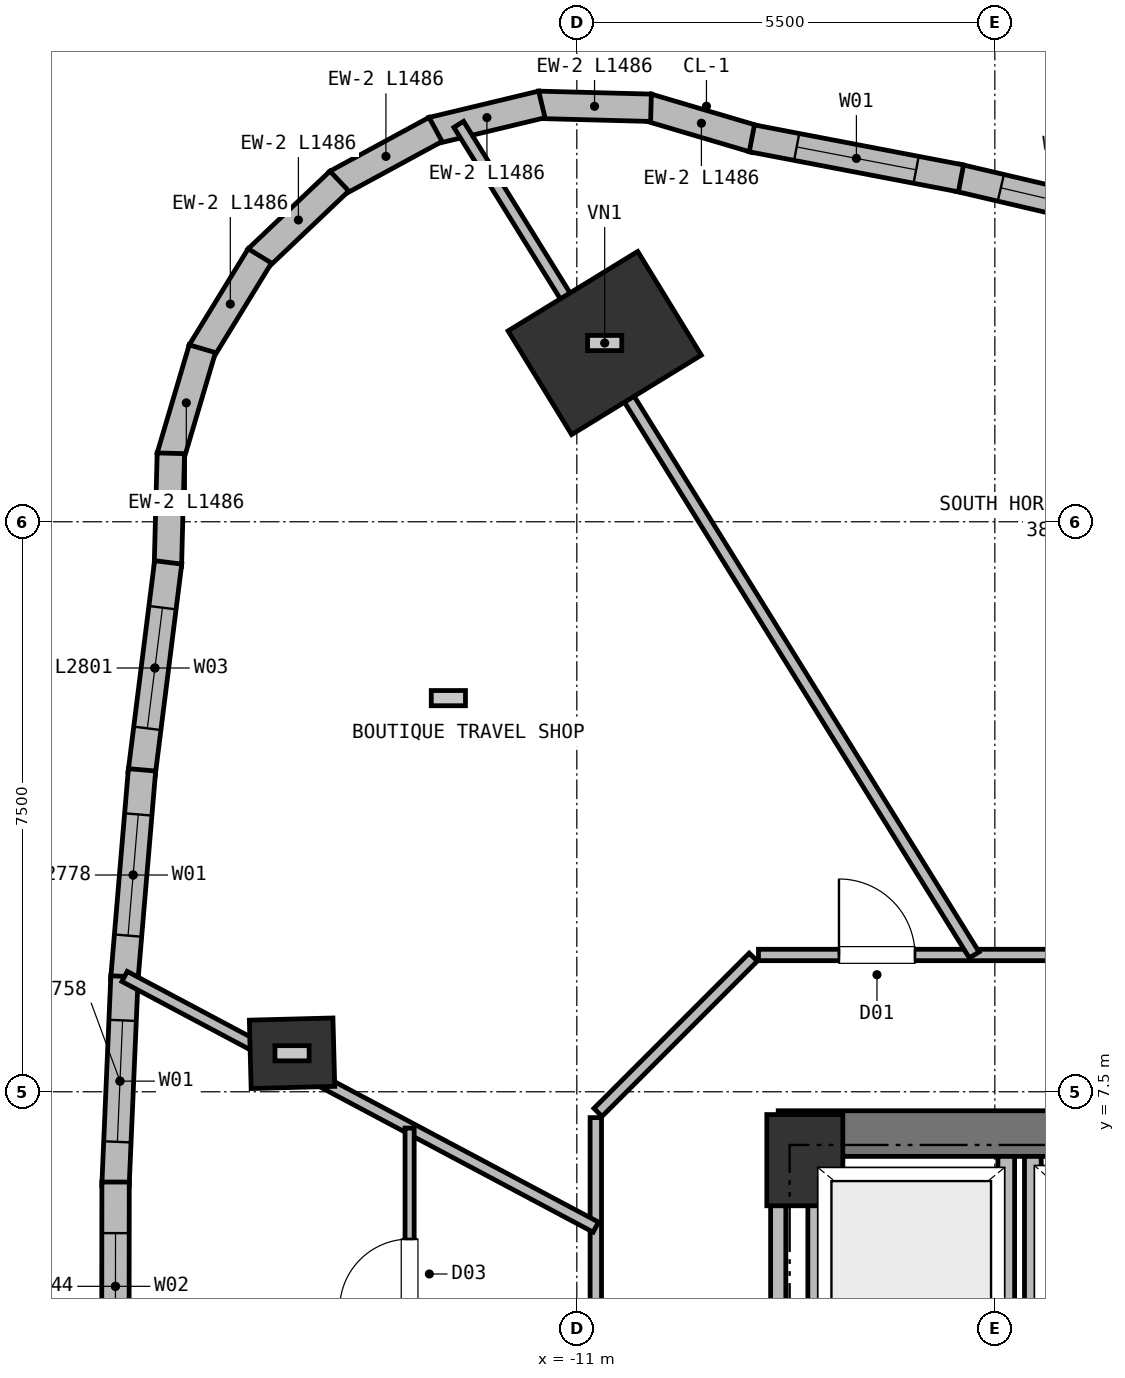
"""IFC4 building model, lengths in metres.
Left out: names, types, materials, properties, quantities, classifications, styles, units other than length and angle.
Written with IfcOpenShell. Run it as: python <this file> out.ifc"""

import sys

from ifc_helpers import new_model, si_unit, direction, frame, frame_2d, origin, origin_2d, place, context, subcontext, project, spatial, rectangle, extrude, element, fill, save


model = new_model("IFC4")
c1 = context("Model", 3, precision=1e-05, world=origin(), true_north=direction((0.0, 1.0)))
c2 = subcontext(c1, "Body", "Model", "MODEL_VIEW")
j1 = project(units=[si_unit("LENGTHUNIT", "METRE"), si_unit("PLANEANGLEUNIT", "RADIAN")], contexts=[c1])
p1 = place(None, origin())
s1 = spatial("IfcSite", under=j1, at=p1, CompositionType="ELEMENT")
p2 = place(p1, origin())
s2 = spatial("IfcBuilding", under=s1, at=p2, CompositionType="ELEMENT")
p3 = place(p2, frame((0.0, 0.0, 142.25)))
s3 = spatial("IfcBuildingStorey", under=s2, at=p3, CompositionType="ELEMENT", Elevation=142.25)
p4 = place(p3, frame((-8.0, 6.6, 0.0), z_axis=(0.0, 0.0, 1.0), x_axis=(1.0, 0.0, 0.0)))
e1 = element("IfcColumn", 1, at=p4, inside=s3, PredefinedType="COLUMN", context=c2, shape_type="SweptSolid", body=[
    extrude(rectangle(XDim=1.0, YDim=1.2, at=origin_2d()), origin(), (0.0, 0.0, 1.0), 3.75),
])
p5 = place(p3, frame((-8.35, 6.95, 0.0), z_axis=(0.0, 0.0, 1.0), x_axis=(1.0, 0.0, 0.0)))
e2 = element("IfcWall", 2, at=p5, inside=s3, PredefinedType="SHEAR", context=c2, shape_type="SweptSolid", body=[
    extrude(rectangle(XDim=16.7, YDim=0.6, at=frame_2d((8.35, 0.0))), origin(), (0.0, 0.0, 1.0), 3.5),
])
p6 = place(p3, frame((-10.633, 17.352, 0.0), z_axis=(0.0, 0.0, 1.0), x_axis=(-0.522498564716, 0.852640164354, 0.0)))
e3 = element("IfcColumn", 3, at=p6, inside=s3, PredefinedType="COLUMN", context=c2, shape_type="SweptSolid", body=[
    extrude(rectangle(XDim=1.6, YDim=2.0, at=origin_2d()), origin(), (0.0, 0.0, 1.0), 3.75),
])
p7 = place(p3, frame((-14.747, 8.007, 0.0), z_axis=(0.0, 0.0, 1.0), x_axis=(-0.026176948308, 0.999657324976, 0.0)))
e4 = element("IfcColumn", 4, at=p7, inside=s3, PredefinedType="COLUMN", context=c2, shape_type="SweptSolid", body=[
    extrude(rectangle(XDim=0.9, YDim=1.1, at=origin_2d()), origin(), (0.0, 0.0, 1.0), 3.75),
])
for number, where, z_axis, x_axis in (
    (5, (-10.073, 20.455, 0.0), (0.0, 0.0, 1.0), (0.959, -0.284, 0.0)),
    (6, (-11.51, 20.486, 0.0), (0.0, 0.0, 1.0), (1.0, -0.026, 0.0)),
):
    element("IfcWall", number, at=place(p3, frame(where, z_axis=z_axis, x_axis=x_axis)), inside=s3, PredefinedType="SOLIDWALL", context=c2, shape_type="SweptSolid", body=[
        extrude(rectangle(XDim=1.486, YDim=0.36, at=frame_2d((0.743, 0.0))), origin(), (0.0, 0.0, 1.0), 3.5),
    ])
p8 = place(p3, frame((-12.905, 20.145, 0.0), z_axis=(0.0, 0.0, 1.0), x_axis=(0.972390285352, 0.233360521413, 0.0)))
e7 = element("IfcWall", 7, at=p8, inside=s3, PredefinedType="SOLIDWALL", context=c2, shape_type="SweptSolid", body=[
    extrude(rectangle(XDim=1.486, YDim=0.36, at=frame_2d((0.743, 0.0))), origin(), (0.0, 0.0, 1.0), 3.5),
])
p9 = place(p3, frame((-14.164, 19.453, 0.0), z_axis=(0.0, 0.0, 1.0), x_axis=(0.87890460574, 0.476997582812, 0.0)))
e8 = element("IfcWall", 8, at=p9, inside=s3, PredefinedType="SOLIDWALL", context=c2, shape_type="SweptSolid", body=[
    extrude(rectangle(XDim=1.486, YDim=0.36, at=frame_2d((0.743, 0.0))), origin(), (0.0, 0.0, 1.0), 3.5),
])
p10 = place(p3, frame((-15.202, 18.46, 0.0), z_axis=(0.0, 0.0, 1.0), x_axis=(0.725352183474, 0.688377955726, 0.0)))
e9 = element("IfcWall", 9, at=p10, inside=s3, PredefinedType="SOLIDWALL", context=c2, shape_type="SweptSolid", body=[
    extrude(rectangle(XDim=1.486, YDim=0.36, at=frame_2d((0.743, 0.0))), origin(), (0.0, 0.0, 1.0), 3.5),
])
p11 = place(p3, frame((-15.947, 17.231, 0.0), z_axis=(0.0, 0.0, 1.0), x_axis=(0.522519673624, 0.852627228439, 0.0)))
e10 = element("IfcWall", 10, at=p11, inside=s3, PredefinedType="SOLIDWALL", context=c2, shape_type="SweptSolid", body=[
    extrude(rectangle(XDim=1.486, YDim=0.36, at=frame_2d((0.743, 0.0))), origin(), (0.0, 0.0, 1.0), 3.5),
])
for number, where, z_axis, x_axis in (
    (11, (-16.349, 15.852, 0.0), (0.0, 0.0, 1.0), (0.284, 0.959, 0.0)),
    (12, (-16.38, 14.416, 0.0), (0.0, 0.0, 1.0), (0.026, 1.0, 0.0)),
):
    element("IfcWall", number, at=place(p3, frame(where, z_axis=z_axis, x_axis=x_axis)), inside=s3, PredefinedType="SOLIDWALL", context=c2, shape_type="SweptSolid", body=[
        extrude(rectangle(XDim=1.486, YDim=0.36, at=frame_2d((0.743, 0.0))), origin(), (0.0, 0.0, 1.0), 3.5),
    ])
p12 = place(p3, frame((-16.725, 11.686, 0.0), z_axis=(0.0, 0.0, 1.0), x_axis=(0.124635429152, 0.992202605217, 0.0)))
e13 = element("IfcWall", 13, at=p12, inside=s3, PredefinedType="SOLIDWALL", context=c2, shape_type="SweptSolid", body=[
    extrude(rectangle(XDim=2.801, YDim=0.36, at=frame_2d((1.4, 0.0))), origin(), (0.0, 0.0, 1.0), 3.5),
])
p13 = place(p12, frame((0.601, 0.0, 0.72)))
e14 = element("IfcOpeningElement", 14, at=p13, cuts=e13, PredefinedType="OPENING", context=c2, shape_type="SweptSolid", body=[
    extrude(rectangle(XDim=1.6, YDim=1.88, at=frame_2d((0.8, 0.94))), frame((0.0, 0.19, 0.0), z_axis=(0.0, -1.0, 0.0), x_axis=(1.0, 0.0, 0.0)), (0.0, 0.0, 1.0), 0.38),
])
p14 = place(p3, frame((-16.954, 8.968, 0.0), z_axis=(0.0, 0.0, 1.0), x_axis=(0.084209356436, 0.996448084091, 0.0)))
e15 = element("IfcWall", 15, at=p14, inside=s3, PredefinedType="SOLIDWALL", context=c2, shape_type="SweptSolid", body=[
    extrude(rectangle(XDim=2.777, YDim=0.36, at=frame_2d((1.389, 0.0))), origin(), (0.0, 0.0, 1.0), 3.5),
])
p15 = place(p14, frame((0.589, 0.0, 0.72)))
e16 = element("IfcOpeningElement", 16, at=p15, cuts=e15, PredefinedType="OPENING", context=c2, shape_type="SweptSolid", body=[
    extrude(rectangle(XDim=1.6, YDim=1.88, at=frame_2d((0.8, 0.94))), frame((0.0, 0.19, 0.0), z_axis=(0.0, -1.0, 0.0), x_axis=(1.0, 0.0, 0.0)), (0.0, 0.0, 1.0), 0.38),
])
p16 = place(p3, frame((-17.07, 6.262, 0.0), z_axis=(0.0, 0.0, 1.0), x_axis=(0.043014721574, 0.999074438532, 0.0)))
e17 = element("IfcWall", 17, at=p16, inside=s3, PredefinedType="SOLIDWALL", context=c2, shape_type="SweptSolid", body=[
    extrude(rectangle(XDim=2.758, YDim=0.36, at=frame_2d((1.379, 0.0))), origin(), (0.0, 0.0, 1.0), 3.5),
])
p17 = place(p16, frame((0.579, 0.0, 0.72)))
e18 = element("IfcOpeningElement", 18, at=p17, cuts=e17, PredefinedType="OPENING", context=c2, shape_type="SweptSolid", body=[
    extrude(rectangle(XDim=1.6, YDim=1.88, at=frame_2d((0.8, 0.94))), frame((0.0, 0.19, 0.0), z_axis=(0.0, -1.0, 0.0), x_axis=(1.0, 0.0, 0.0)), (0.0, 0.0, 1.0), 0.38),
])
p18 = place(p3, frame((-17.072, 3.568, 0.0), z_axis=(0.0, 0.0, 1.0), x_axis=(0.001156582856, 0.999999331158, 0.0)))
e19 = element("IfcWall", 19, at=p18, inside=s3, PredefinedType="SOLIDWALL", context=c2, shape_type="SweptSolid", body=[
    extrude(rectangle(XDim=2.744, YDim=0.36, at=frame_2d((1.372, 0.0))), origin(), (0.0, 0.0, 1.0), 3.5),
])
p19 = place(p18, frame((0.672, 0.0, 0.72)))
e20 = element("IfcOpeningElement", 20, at=p19, cuts=e19, PredefinedType="OPENING", context=c2, shape_type="SweptSolid", body=[
    extrude(rectangle(XDim=1.4, YDim=1.84, at=frame_2d((0.7, 0.92))), frame((0.0, 0.19, 0.0), z_axis=(0.0, -1.0, 0.0), x_axis=(1.0, 0.0, 0.0)), (0.0, 0.0, 1.0), 0.38),
])
p20 = place(p3, frame((-5.995, 19.528, 0.0), z_axis=(0.0, 0.0, 1.0), x_axis=(0.973697722737, -0.227843684873, 0.0)))
e21 = element("IfcWall", 21, at=p20, inside=s3, PredefinedType="SOLIDWALL", context=c2, shape_type="SweptSolid", body=[
    extrude(rectangle(XDim=2.777, YDim=0.36, at=frame_2d((1.389, 0.0))), origin(), (0.0, 0.0, 1.0), 3.5),
])
p21 = place(p20, frame((0.589, 0.0, 0.72)))
e22 = element("IfcOpeningElement", 22, at=p21, cuts=e21, PredefinedType="OPENING", context=c2, shape_type="SweptSolid", body=[
    extrude(rectangle(XDim=1.6, YDim=1.88, at=frame_2d((0.8, 0.94))), frame((0.0, 0.19, 0.0), z_axis=(0.0, -1.0, 0.0), x_axis=(1.0, 0.0, 0.0)), (0.0, 0.0, 1.0), 0.38),
])
p22 = place(p3, frame((-8.697, 20.045, 0.0), z_axis=(0.0, 0.0, 1.0), x_axis=(0.982153479192, -0.188081214668, 0.0)))
e23 = element("IfcWall", 23, at=p22, inside=s3, PredefinedType="SOLIDWALL", context=c2, shape_type="SweptSolid", body=[
    extrude(rectangle(XDim=2.801, YDim=0.36, at=frame_2d((1.401, 0.0))), origin(), (0.0, 0.0, 1.0), 3.5),
])
p23 = place(p22, frame((0.601, 0.0, 0.72)))
e24 = element("IfcOpeningElement", 24, at=p23, cuts=e23, PredefinedType="OPENING", context=c2, shape_type="SweptSolid", body=[
    extrude(rectangle(XDim=1.6, YDim=1.88, at=frame_2d((0.8, 0.94))), frame((0.0, 0.19, 0.0), z_axis=(0.0, -1.0, 0.0), x_axis=(1.0, 0.0, 0.0)), (0.0, 0.0, 1.0), 0.38),
])
p24 = place(p3, frame((-7.85, 4.57, 0.0), z_axis=(0.0, 0.0, 1.0), x_axis=(0.0, 1.0, 0.0)))
e25 = element("IfcWall", 25, at=p24, inside=s3, PredefinedType="PARTITIONING", context=c2, shape_type="SweptSolid", body=[
    extrude(rectangle(XDim=2.08, YDim=0.22, at=frame_2d((1.04, 0.0))), origin(), (0.0, 0.0, 1.0), 3.12),
])
for number, where, z_axis, x_axis in (
    (26, (-5.35, 4.57, 0.0), (0.0, 0.0, 1.0), (0.0, 1.0, 0.0)),
    (27, (-5.0, 4.57, 0.0), (0.0, 0.0, 1.0), (0.0, 1.0, 0.0)),
):
    element("IfcWall", number, at=place(p3, frame(where, z_axis=z_axis, x_axis=x_axis)), inside=s3, PredefinedType="PARTITIONING", context=c2, shape_type="SweptSolid", body=[
        extrude(rectangle(XDim=2.08, YDim=0.22, at=frame_2d((1.04, 0.0))), origin(), (0.0, 0.0, 1.0), 3.5),
    ])
p25 = place(p3, frame((-8.35, 1.15, 0.0), z_axis=(0.0, 0.0, 1.0), x_axis=(0.0, 1.0, 0.0)))
e28 = element("IfcWall", 28, at=p25, inside=s3, PredefinedType="PARTITIONING", context=c2, shape_type="SweptSolid", body=[
    extrude(rectangle(XDim=5.4, YDim=0.2, at=frame_2d((2.7, 0.0))), origin(), (0.0, 0.0, 1.0), 3.5),
])
p26 = place(p25, frame((0.95, 0.0, 0.0)))
e29 = element("IfcOpeningElement", 29, at=p26, cuts=e28, PredefinedType="OPENING", context=c2, shape_type="SweptSolid", body=[
    extrude(rectangle(XDim=1.15, YDim=2.15, at=frame_2d((0.575, 1.075))), frame((0.0, 0.11, 0.0), z_axis=(0.0, -1.0, 0.0), x_axis=(1.0, 0.0, 0.0)), (0.0, 0.0, 1.0), 0.22),
])
p27 = place(p3, frame((-8.61, 9.3, 0.0), z_axis=(0.0, 0.0, 1.0), x_axis=(1.0, 0.0, 0.0)))
e30 = element("IfcWall", 30, at=p27, inside=s3, PredefinedType="PARTITIONING", context=c2, shape_type="SweptSolid", body=[
    extrude(rectangle(XDim=17.22, YDim=0.15, at=frame_2d((8.61, 0.0))), origin(), (0.0, 0.0, 1.0), 3.5),
])
p28 = place(p27, frame((11.966, 0.0, 0.0)))
e31 = element("IfcOpeningElement", 31, at=p28, cuts=e30, PredefinedType="OPENING", context=c2, shape_type="SweptSolid", body=[
    extrude(rectangle(XDim=1.0, YDim=2.15, at=frame_2d((0.5, 1.075))), frame((0.0, 0.085, 0.0), z_axis=(0.0, -1.0, 0.0), x_axis=(1.0, 0.0, 0.0)), (0.0, 0.0, 1.0), 0.17),
])
p29 = place(p27, frame((1.059, 0.0, 0.0)))
e32 = element("IfcOpeningElement", 32, at=p29, cuts=e30, PredefinedType="OPENING", context=c2, shape_type="SweptSolid", body=[
    extrude(rectangle(XDim=1.0, YDim=2.15, at=frame_2d((0.5, 1.075))), frame((0.0, 0.085, 0.0), z_axis=(0.0, -1.0, 0.0), x_axis=(1.0, 0.0, 0.0)), (0.0, 0.0, 1.0), 0.17),
])
p30 = place(p27, frame((4.252, 0.0, 0.0)))
e33 = element("IfcOpeningElement", 33, at=p30, cuts=e30, PredefinedType="OPENING", context=c2, shape_type="SweptSolid", body=[
    extrude(rectangle(XDim=1.06, YDim=2.15, at=frame_2d((0.53, 1.075))), frame((0.0, 0.085, 0.0), z_axis=(0.0, -1.0, 0.0), x_axis=(1.0, 0.0, 0.0)), (0.0, 0.0, 1.0), 0.17),
])
p31 = place(p3, frame((-10.722, 7.228, 0.0), z_axis=(0.0, 0.0, 1.0), x_axis=(0.707106781187, 0.707106781187, 0.0)))
e34 = element("IfcWall", 34, at=p31, inside=s3, PredefinedType="PARTITIONING", context=c2, shape_type="SweptSolid", body=[
    extrude(rectangle(XDim=2.89, YDim=0.15, at=frame_2d((1.445, 0.0))), origin(), (0.0, 0.0, 1.0), 3.5),
])
p32 = place(p3, frame((-10.75, -5.76, 0.0), z_axis=(0.0, 0.0, 1.0), x_axis=(0.0, 1.0, 0.0)))
e35 = element("IfcWall", 35, at=p32, inside=s3, PredefinedType="PARTITIONING", context=c2, shape_type="SweptSolid", body=[
    extrude(rectangle(XDim=12.92, YDim=0.15, at=frame_2d((6.46, 0.0))), origin(), (0.0, 0.0, 1.0), 3.5),
])
p33 = place(p32, frame((1.293, 0.0, 0.0)))
e36 = element("IfcOpeningElement", 36, at=p33, cuts=e35, PredefinedType="OPENING", context=c2, shape_type="SweptSolid", body=[
    extrude(rectangle(XDim=0.95, YDim=2.1, at=frame_2d((0.475, 1.05))), frame((0.0, 0.085, 0.0), z_axis=(0.0, -1.0, 0.0), x_axis=(1.0, 0.0, 0.0)), (0.0, 0.0, 1.0), 0.17),
])
p34 = place(p32, frame((3.575, 0.0, 0.0)))
e37 = element("IfcOpeningElement", 37, at=p34, cuts=e35, PredefinedType="OPENING", context=c2, shape_type="SweptSolid", body=[
    extrude(rectangle(XDim=1.0, YDim=2.15, at=frame_2d((0.5, 1.075))), frame((0.0, 0.085, 0.0), z_axis=(0.0, -1.0, 0.0), x_axis=(1.0, 0.0, 0.0)), (0.0, 0.0, 1.0), 0.17),
])
p35 = place(p32, frame((6.287, 0.0, 0.0)))
e38 = element("IfcOpeningElement", 38, at=p35, cuts=e35, PredefinedType="OPENING", context=c2, shape_type="SweptSolid", body=[
    extrude(rectangle(XDim=1.0, YDim=2.15, at=frame_2d((0.5, 1.075))), frame((0.0, 0.085, 0.0), z_axis=(0.0, -1.0, 0.0), x_axis=(1.0, 0.0, 0.0)), (0.0, 0.0, 1.0), 0.17),
])
p36 = place(p3, frame((-5.771, 9.3, 0.0), z_axis=(0.0, 0.0, 1.0), x_axis=(-0.527300490904, 0.849678875983, 0.0)))
e39 = element("IfcWall", 39, at=p36, inside=s3, PredefinedType="PARTITIONING", context=c2, shape_type="SweptSolid", body=[
    extrude(rectangle(XDim=12.862, YDim=0.15, at=frame_2d((6.431, 0.0))), origin(), (0.0, 0.0, 1.0), 3.5),
])
p37 = place(p3, frame((-10.75, 5.719, 0.0), z_axis=(0.0, 0.0, 1.0), x_axis=(-0.882843253565, 0.469667743873, 0.0)))
e40 = element("IfcWall", 40, at=p37, inside=s3, PredefinedType="PARTITIONING", context=c2, shape_type="SweptSolid", body=[
    extrude(rectangle(XDim=7.023, YDim=0.15, at=frame_2d((3.511, 0.0))), origin(), (0.0, 0.0, 1.0), 3.5),
])
p38 = place(p3, frame((-13.2, 3.183, 0.0), z_axis=(0.0, 0.0, 1.0), x_axis=(0.0, 1.0, 0.0)))
e41 = element("IfcWall", 41, at=p38, inside=s3, PredefinedType="PARTITIONING", context=c2, shape_type="SweptSolid", body=[
    extrude(rectangle(XDim=3.84, YDim=0.12, at=frame_2d((1.92, 0.0))), origin(), (0.0, 0.0, 1.0), 3.5),
])
p39 = place(p38, frame((1.46, 0.0, 0.0)))
e42 = element("IfcOpeningElement", 42, at=p39, cuts=e41, PredefinedType="OPENING", context=c2, shape_type="SweptSolid", body=[
    extrude(rectangle(XDim=0.92, YDim=2.1, at=frame_2d((0.46, 1.05))), frame((0.0, 0.07, 0.0), z_axis=(0.0, -1.0, 0.0), x_axis=(1.0, 0.0, 0.0)), (0.0, 0.0, 1.0), 0.14),
])
p40 = place(p13, origin())
e43 = element("IfcWindow", 43, at=p40, inside=s3, PartitioningType="SINGLE_PANEL", PredefinedType="WINDOW", context=c2, shape_type="SweptSolid", body=[
    extrude(rectangle(XDim=1.6, YDim=1.88, at=frame_2d((0.8, 0.94))), frame((0.0, 0.03, 0.0), z_axis=(0.0, -1.0, 0.0), x_axis=(1.0, 0.0, 0.0)), (0.0, 0.0, 1.0), 0.06),
])
fill(e14, e43)
p41 = place(p15, origin())
e44 = element("IfcWindow", 44, at=p41, inside=s3, PartitioningType="SINGLE_PANEL", PredefinedType="WINDOW", context=c2, shape_type="SweptSolid", body=[
    extrude(rectangle(XDim=1.6, YDim=1.88, at=frame_2d((0.8, 0.94))), frame((0.0, 0.03, 0.0), z_axis=(0.0, -1.0, 0.0), x_axis=(1.0, 0.0, 0.0)), (0.0, 0.0, 1.0), 0.06),
])
fill(e16, e44)
p42 = place(p17, origin())
e45 = element("IfcWindow", 45, at=p42, inside=s3, PartitioningType="SINGLE_PANEL", PredefinedType="WINDOW", context=c2, shape_type="SweptSolid", body=[
    extrude(rectangle(XDim=1.6, YDim=1.88, at=frame_2d((0.8, 0.94))), frame((0.0, 0.03, 0.0), z_axis=(0.0, -1.0, 0.0), x_axis=(1.0, 0.0, 0.0)), (0.0, 0.0, 1.0), 0.06),
])
fill(e18, e45)
p43 = place(p19, origin())
e46 = element("IfcWindow", 46, at=p43, inside=s3, PartitioningType="SINGLE_PANEL", PredefinedType="WINDOW", context=c2, shape_type="SweptSolid", body=[
    extrude(rectangle(XDim=1.4, YDim=1.84, at=frame_2d((0.7, 0.92))), frame((0.0, 0.03, 0.0), z_axis=(0.0, -1.0, 0.0), x_axis=(1.0, 0.0, 0.0)), (0.0, 0.0, 1.0), 0.06),
])
fill(e20, e46)
p44 = place(p21, origin())
e47 = element("IfcWindow", 47, at=p44, inside=s3, PartitioningType="SINGLE_PANEL", PredefinedType="WINDOW", context=c2, shape_type="SweptSolid", body=[
    extrude(rectangle(XDim=1.6, YDim=1.88, at=frame_2d((0.8, 0.94))), frame((0.0, 0.03, 0.0), z_axis=(0.0, -1.0, 0.0), x_axis=(1.0, 0.0, 0.0)), (0.0, 0.0, 1.0), 0.06),
])
fill(e22, e47)
p45 = place(p23, origin())
e48 = element("IfcWindow", 48, at=p45, inside=s3, PartitioningType="SINGLE_PANEL", PredefinedType="WINDOW", context=c2, shape_type="SweptSolid", body=[
    extrude(rectangle(XDim=1.6, YDim=1.88, at=frame_2d((0.8, 0.94))), frame((0.0, 0.03, 0.0), z_axis=(0.0, -1.0, 0.0), x_axis=(1.0, 0.0, 0.0)), (0.0, 0.0, 1.0), 0.06),
])
fill(e24, e48)
p46 = place(p39, origin())
e49 = element("IfcDoor", 49, at=p46, inside=s3, OperationType="SINGLE_SWING_LEFT", PredefinedType="DOOR", context=c2, shape_type="SweptSolid", body=[
    extrude(rectangle(XDim=0.92, YDim=2.1, at=frame_2d((0.46, 1.05))), frame((0.0, 0.025, 0.0), z_axis=(0.0, -1.0, 0.0), x_axis=(1.0, 0.0, 0.0)), (0.0, 0.0, 1.0), 0.05),
])
fill(e42, e49)
p47 = place(p29, origin())
e50 = element("IfcDoor", 50, at=p47, inside=s3, OperationType="SINGLE_SWING_LEFT", PredefinedType="DOOR", context=c2, shape_type="SweptSolid", body=[
    extrude(rectangle(XDim=1.0, YDim=2.15, at=frame_2d((0.5, 1.075))), frame((0.0, 0.025, 0.0), z_axis=(0.0, -1.0, 0.0), x_axis=(1.0, 0.0, 0.0)), (0.0, 0.0, 1.0), 0.05),
])
fill(e32, e50)
save(model, sys.argv[1])
